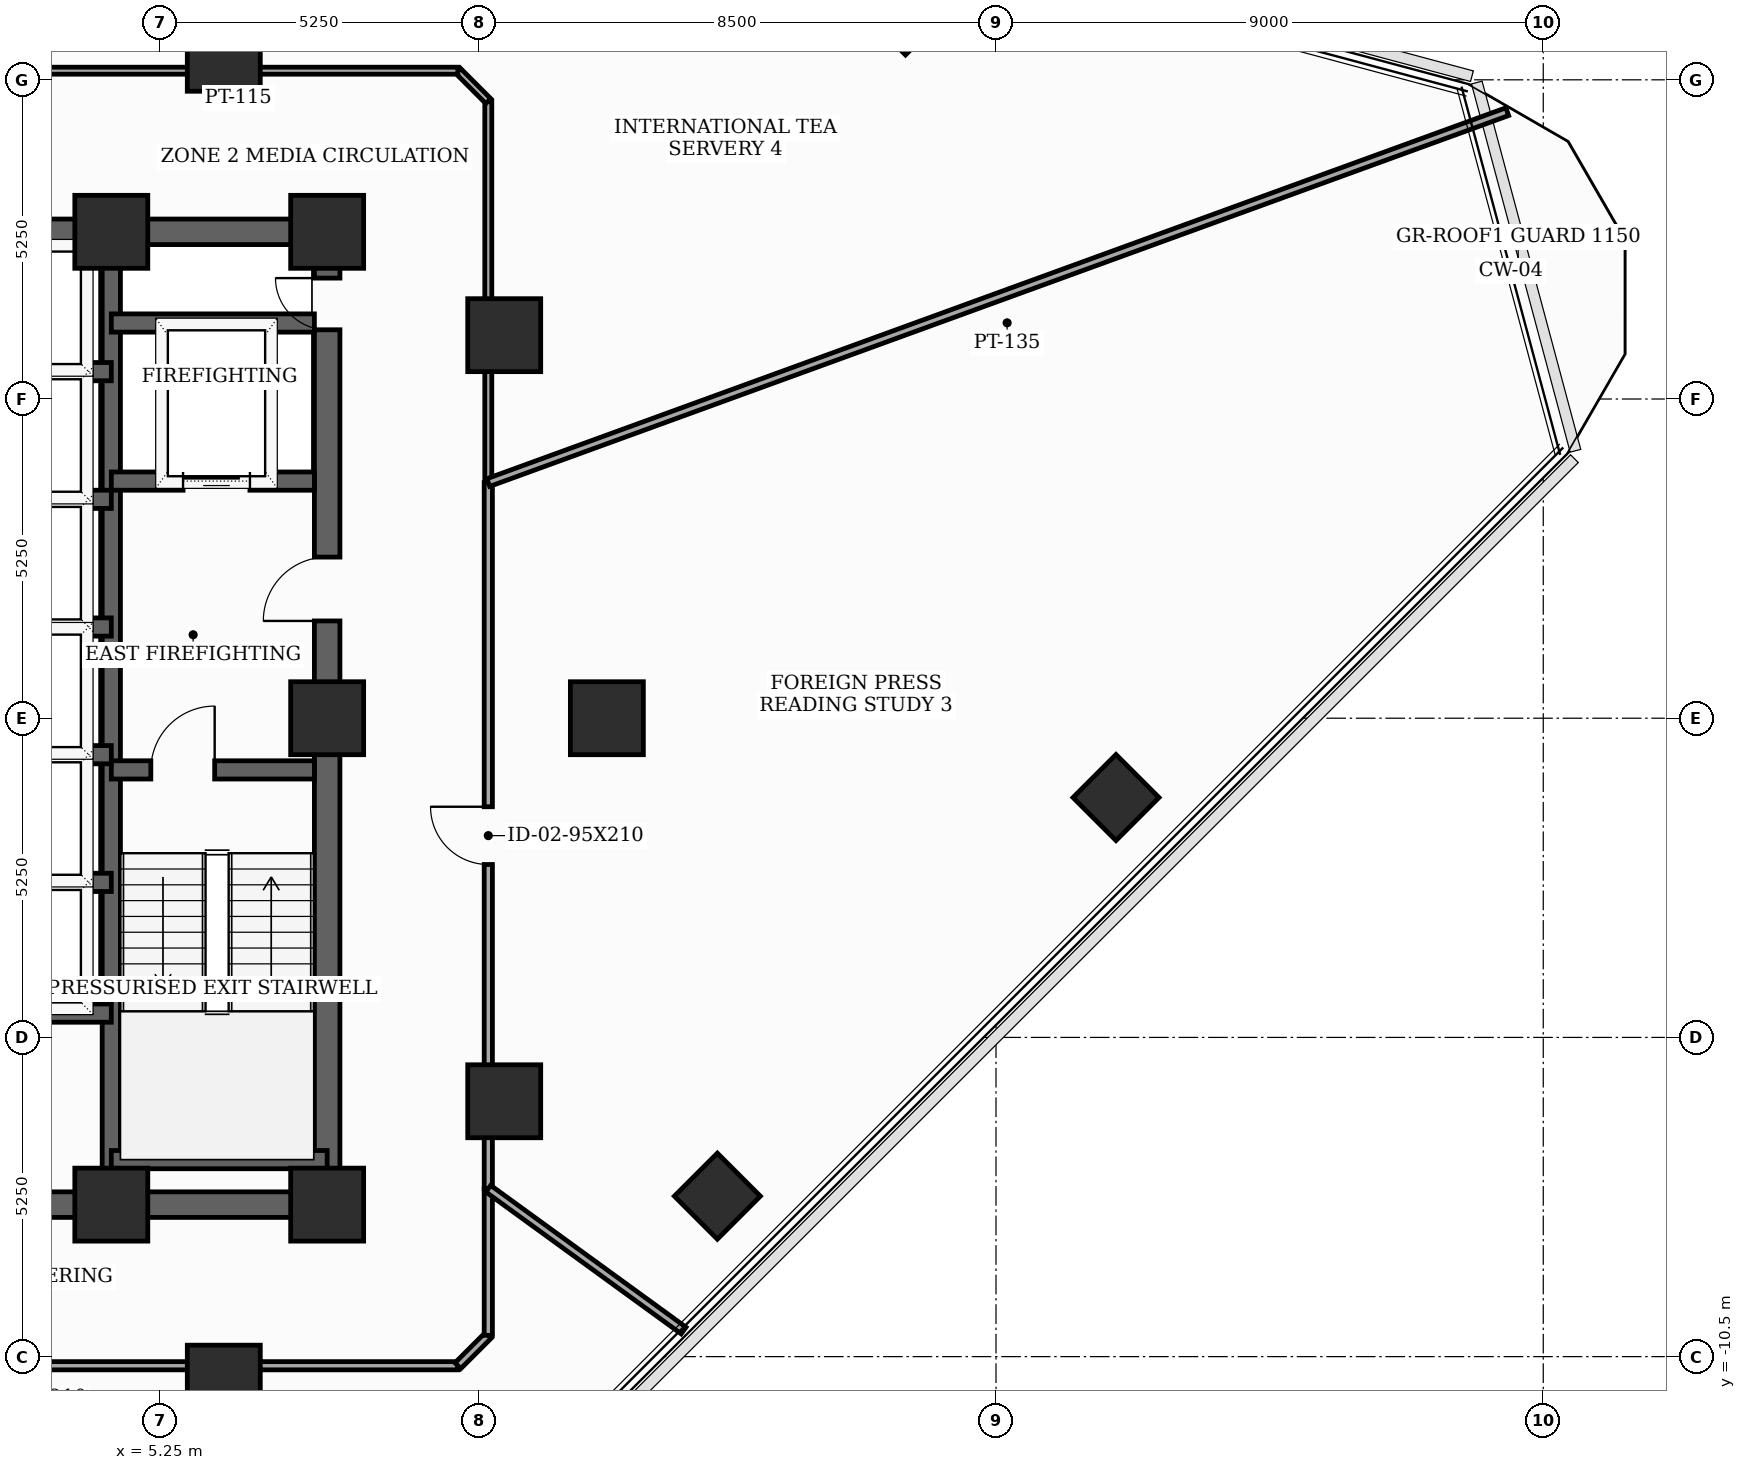
"""IFC4 building model, lengths in metres.
Left out: names, types, materials, properties, quantities, classifications, styles, units other than length and angle.
Written with IfcOpenShell. Run it as: python <this file> out.ifc"""

import sys

from ifc_helpers import new_model, si_unit, direction, frame, frame_2d, origin, origin_2d, place, context, subcontext, project, spatial, rectangle, extrude, element, fill, save


model = new_model("IFC4")
c1 = context("Model", 3, precision=1e-05, world=origin(), true_north=direction((0.0, 1.0)))
c2 = subcontext(c1, "Body", "Model", "MODEL_VIEW")
j1 = project(units=[si_unit("LENGTHUNIT", "METRE"), si_unit("PLANEANGLEUNIT", "RADIAN")], contexts=[c1])
p1 = place(None, origin())
s1 = spatial("IfcSite", under=j1, at=p1, CompositionType="ELEMENT")
p2 = place(p1, origin())
s2 = spatial("IfcBuilding", under=s1, at=p2, CompositionType="ELEMENT")
p3 = place(p2, frame((0.0, 0.0, 202.7)))
s3 = spatial("IfcBuildingStorey", under=s2, at=p3, CompositionType="ELEMENT", Elevation=202.7)
for number, where, z_axis, x_axis in (
    (1, (4.45, -8.0, 0.0), (0.0, 0.0, 1.0), (1.0, 0.0, 0.0)),
    (2, (8.0, -8.0, 0.0), (0.0, 0.0, 1.0), (1.0, 0.0, 0.0)),
    (3, (8.0, 0.0, 0.0), (0.0, 0.0, 1.0), (1.0, 0.0, 0.0)),
    (4, (8.0, 8.0, 0.0), (0.0, 0.0, 1.0), (1.0, 0.0, 0.0)),
    (5, (4.45, 8.0, 0.0), (0.0, 0.0, 1.0), (1.0, 0.0, 0.0)),
    (6, (12.6, 0.0, 0.0), (0.0, 0.0, 1.0), (1.0, 0.0, 0.0)),
    (7, (10.912, 6.3, 0.0), (0.0, 0.0, 1.0), (1.0, 0.0, 0.0)),
    (8, (6.3, 10.912, 0.0), (0.0, 0.0, 1.0), (1.0, 0.0, 0.0)),
    (9, (6.3, -10.912, 0.0), (0.0, 0.0, 1.0), (1.0, 0.0, 0.0)),
    (10, (10.912, -6.3, 0.0), (0.0, 0.0, 1.0), (1.0, 0.0, 0.0)),
):
    element("IfcColumn", number, at=place(p3, frame(where, z_axis=z_axis, x_axis=x_axis)), inside=s3, PredefinedType="COLUMN", context=c2, shape_type="SweptSolid", body=[
        extrude(rectangle(XDim=1.2, YDim=1.2, at=origin_2d()), origin(), (0.0, 0.0, 1.0), 3.7),
    ])
for number, where, z_axis, x_axis in (
    (11, (14.417, -7.861, 0.0), (0.0, 0.0, 1.0), (0.707, 0.707, 0.0)),
    (12, (20.973, -1.305, 0.0), (0.0, 0.0, 1.0), (0.707, 0.707, 0.0)),
    (13, (17.511, 11.616, 0.0), (0.0, 0.0, 1.0), (0.707, 0.707, 0.0)),
):
    element("IfcColumn", number, at=place(p3, frame(where, z_axis=z_axis, x_axis=x_axis)), inside=s3, PredefinedType="COLUMN", context=c2, shape_type="SweptSolid", body=[
        extrude(rectangle(XDim=1.0, YDim=1.0, at=origin_2d()), origin(), (0.0, 0.0, 1.0), 3.7),
    ])
p4 = place(p3, frame((8.0, -8.0, 0.0), z_axis=(0.0, 0.0, 1.0), x_axis=(0.0, 1.0, 0.0)))
e14 = element("IfcWall", 14, at=p4, inside=s3, PredefinedType="SHEAR", context=c2, shape_type="SweptSolid", body=[
    extrude(rectangle(XDim=16.0, YDim=0.42, at=frame_2d((8.0, 0.0))), origin(), (0.0, 0.0, 1.0), 3.5),
])
p5 = place(p4, frame((9.6, 0.0, 0.0)))
e15 = element("IfcOpeningElement", 15, at=p5, cuts=e14, PredefinedType="OPENING", context=c2, shape_type="SweptSolid", body=[
    extrude(rectangle(XDim=1.05, YDim=2.15, at=frame_2d((0.525, 1.075))), frame((0.0, 0.22, 0.0), z_axis=(0.0, -1.0, 0.0), x_axis=(1.0, 0.0, 0.0)), (0.0, 0.0, 1.0), 0.44),
])
p6 = place(p4, frame((14.389, 0.0, 0.0)))
e16 = element("IfcOpeningElement", 16, at=p6, cuts=e14, PredefinedType="OPENING", context=c2, shape_type="SweptSolid", body=[
    extrude(rectangle(XDim=0.85, YDim=2.02, at=frame_2d((0.425, 1.01))), frame((0.0, 0.22, 0.0), z_axis=(0.0, -1.0, 0.0), x_axis=(1.0, 0.0, 0.0)), (0.0, 0.0, 1.0), 0.44),
])
p7 = place(p3, frame((-8.0, -8.0, 0.0), z_axis=(0.0, 0.0, 1.0), x_axis=(1.0, 0.0, 0.0)))
e17 = element("IfcWall", 17, at=p7, inside=s3, PredefinedType="SHEAR", context=c2, shape_type="SweptSolid", body=[
    extrude(rectangle(XDim=16.0, YDim=0.42, at=frame_2d((8.0, 0.0))), origin(), (0.0, 0.0, 1.0), 3.5),
])
p8 = place(p7, frame((4.6, 0.0, 0.0)))
e18 = element("IfcOpeningElement", 18, at=p8, cuts=e17, PredefinedType="OPENING", context=c2, shape_type="SweptSolid", body=[
    extrude(rectangle(XDim=0.95, YDim=2.1, at=frame_2d((0.475, 1.05))), frame((0.0, 0.22, 0.0), z_axis=(0.0, -1.0, 0.0), x_axis=(1.0, 0.0, 0.0)), (0.0, 0.0, 1.0), 0.44),
])
p9 = place(p7, frame((7.52, 0.0, 0.0)))
e19 = element("IfcOpeningElement", 19, at=p9, cuts=e17, PredefinedType="OPENING", context=c2, shape_type="SweptSolid", body=[
    extrude(rectangle(XDim=0.95, YDim=2.1, at=frame_2d((0.475, 1.05))), frame((0.0, 0.22, 0.0), z_axis=(0.0, -1.0, 0.0), x_axis=(1.0, 0.0, 0.0)), (0.0, 0.0, 1.0), 0.44),
])
p10 = place(p7, frame((10.45, 0.0, 0.0)))
e20 = element("IfcOpeningElement", 20, at=p10, cuts=e17, PredefinedType="OPENING", context=c2, shape_type="SweptSolid", body=[
    extrude(rectangle(XDim=0.95, YDim=2.1, at=frame_2d((0.475, 1.05))), frame((0.0, 0.22, 0.0), z_axis=(0.0, -1.0, 0.0), x_axis=(1.0, 0.0, 0.0)), (0.0, 0.0, 1.0), 0.44),
])
p11 = place(p3, frame((-8.0, 8.0, 0.0), z_axis=(0.0, 0.0, 1.0), x_axis=(1.0, 0.0, 0.0)))
e21 = element("IfcWall", 21, at=p11, inside=s3, PredefinedType="SHEAR", context=c2, shape_type="SweptSolid", body=[
    extrude(rectangle(XDim=16.0, YDim=0.42, at=frame_2d((8.0, 0.0))), origin(), (0.0, 0.0, 1.0), 3.5),
])
p12 = place(p11, frame((7.1, 0.0, 0.0)))
e22 = element("IfcOpeningElement", 22, at=p12, cuts=e21, PredefinedType="OPENING", context=c2, shape_type="SweptSolid", body=[
    extrude(rectangle(XDim=1.8, YDim=2.15, at=frame_2d((0.9, 1.075))), frame((0.0, 0.22, 0.0), z_axis=(0.0, -1.0, 0.0), x_axis=(1.0, 0.0, 0.0)), (0.0, 0.0, 1.0), 0.44),
])
p13 = place(p3, frame((4.45, -7.79, 0.0), z_axis=(0.0, 0.0, 1.0), x_axis=(0.0, 1.0, 0.0)))
e23 = element("IfcWall", 23, at=p13, inside=s3, PredefinedType="SHEAR", context=c2, shape_type="SweptSolid", body=[
    extrude(rectangle(XDim=15.58, YDim=0.3, at=frame_2d((7.79, 0.0))), origin(), (0.0, 0.0, 1.0), 3.5),
])
p14 = place(p3, frame((4.45, -0.85, 0.0), z_axis=(0.0, 0.0, 1.0), x_axis=(1.0, 0.0, 0.0)))
e24 = element("IfcWall", 24, at=p14, inside=s3, PredefinedType="SHEAR", context=c2, shape_type="SweptSolid", body=[
    extrude(rectangle(XDim=3.34, YDim=0.3, at=frame_2d((1.67, 0.0))), origin(), (0.0, 0.0, 1.0), 3.5),
])
p15 = place(p14, frame((0.65, 0.0, 0.0)))
e25 = element("IfcOpeningElement", 25, at=p15, cuts=e24, PredefinedType="OPENING", context=c2, shape_type="SweptSolid", body=[
    extrude(rectangle(XDim=1.05, YDim=2.15, at=frame_2d((0.525, 1.075))), frame((0.0, 0.16, 0.0), z_axis=(0.0, -1.0, 0.0), x_axis=(1.0, 0.0, 0.0)), (0.0, 0.0, 1.0), 0.32),
])
p16 = place(p3, frame((4.45, -7.26, 0.0), z_axis=(0.0, 0.0, 1.0), x_axis=(1.0, 0.0, 0.0)))
e26 = element("IfcWall", 26, at=p16, inside=s3, PredefinedType="SHEAR", context=c2, shape_type="SweptSolid", body=[
    extrude(rectangle(XDim=3.55, YDim=0.3, at=frame_2d((1.775, 0.0))), origin(), (0.0, 0.0, 1.0), 3.5),
])
p17 = place(p3, frame((4.45, 3.9, 0.0), z_axis=(0.0, 0.0, 1.0), x_axis=(1.0, 0.0, 0.0)))
e27 = element("IfcWall", 27, at=p17, inside=s3, PredefinedType="SHEAR", context=c2, shape_type="SweptSolid", body=[
    extrude(rectangle(XDim=3.34, YDim=0.3, at=frame_2d((1.67, 0.0))), origin(), (0.0, 0.0, 1.0), 3.5),
])
p18 = place(p17, frame((1.18, 0.0, 0.0)))
e28 = element("IfcOpeningElement", 28, at=p18, cuts=e27, PredefinedType="OPENING", context=c2, shape_type="SweptSolid", body=[
    extrude(rectangle(XDim=1.1, YDim=2.1, at=frame_2d((0.55, 1.05))), frame((0.0, 0.16, 0.0), z_axis=(0.0, -1.0, 0.0), x_axis=(1.0, 0.0, 0.0)), (0.0, 0.0, 1.0), 0.32),
])
p19 = place(p3, frame((4.45, 6.5, 0.0), z_axis=(0.0, 0.0, 1.0), x_axis=(1.0, 0.0, 0.0)))
e29 = element("IfcWall", 29, at=p19, inside=s3, PredefinedType="SHEAR", context=c2, shape_type="SweptSolid", body=[
    extrude(rectangle(XDim=3.34, YDim=0.3, at=frame_2d((1.67, 0.0))), origin(), (0.0, 0.0, 1.0), 3.5),
])
p20 = place(p3, frame((-4.45, -4.85, 0.0), z_axis=(0.0, 0.0, 1.0), x_axis=(1.0, 0.0, 0.0)))
e30 = element("IfcWall", 30, at=p20, inside=s3, PredefinedType="SHEAR", context=c2, shape_type="SweptSolid", body=[
    extrude(rectangle(XDim=8.9, YDim=0.3, at=frame_2d((4.45, 0.0))), origin(), (0.0, 0.0, 1.0), 3.5),
])
for number, where, z_axis, x_axis in (
    (31, (1.68, 1.5, 0.0), (0.0, 0.0, 1.0), (1.0, 0.0, 0.0)),
    (32, (1.68, 3.6, 0.0), (0.0, 0.0, 1.0), (1.0, 0.0, 0.0)),
    (33, (1.68, 5.7, 0.0), (0.0, 0.0, 1.0), (1.0, 0.0, 0.0)),
    (34, (1.68, -2.7, 0.0), (0.0, 0.0, 1.0), (1.0, 0.0, 0.0)),
    (35, (1.68, -0.6, 0.0), (0.0, 0.0, 1.0), (1.0, 0.0, 0.0)),
):
    element("IfcWall", number, at=place(p3, frame(where, z_axis=z_axis, x_axis=x_axis)), inside=s3, PredefinedType="SHEAR", context=c2, shape_type="SweptSolid", body=[
        extrude(rectangle(XDim=2.77, YDim=0.3, at=frame_2d((1.385, 0.0))), origin(), (0.0, 0.0, 1.0), 3.5),
    ])
p21 = place(p3, frame((-4.303, -10.65, 0.0), z_axis=(0.0, 0.0, 1.0), x_axis=(1.0, 0.0, 0.0)))
e36 = element("IfcWall", 36, at=p21, inside=s3, PredefinedType="PARTITIONING", context=c2, shape_type="SweptSolid", body=[
    extrude(rectangle(XDim=14.453, YDim=0.135, at=frame_2d((7.227, 0.0))), origin(), (0.0, 0.0, 1.0), 2.885),
])
p22 = place(p21, frame((6.751, 0.0, 0.0)))
e37 = element("IfcOpeningElement", 37, at=p22, cuts=e36, PredefinedType="OPENING", context=c2, shape_type="SweptSolid", body=[
    extrude(rectangle(XDim=0.95, YDim=2.1, at=frame_2d((0.475, 1.05))), frame((0.0, 0.077, 0.0), z_axis=(0.0, -1.0, 0.0), x_axis=(1.0, 0.0, 0.0)), (0.0, 0.0, 1.0), 0.155),
])
p23 = place(p3, frame((10.15, -10.65, 0.0), z_axis=(0.0, 0.0, 1.0), x_axis=(0.707106781187, 0.707106781187, 0.0)))
e38 = element("IfcWall", 38, at=p23, inside=s3, PredefinedType="PARTITIONING", context=c2, shape_type="SweptSolid", body=[
    extrude(rectangle(XDim=0.707, YDim=0.135, at=frame_2d((0.354, 0.0))), origin(), (0.0, 0.0, 1.0), 3.5),
])
p24 = place(p3, frame((10.65, -10.15, 0.0), z_axis=(0.0, 0.0, 1.0), x_axis=(0.0, 1.0, 0.0)))
e39 = element("IfcWall", 39, at=p24, inside=s3, PredefinedType="PARTITIONING", context=c2, shape_type="SweptSolid", body=[
    extrude(rectangle(XDim=2.412, YDim=0.135, at=frame_2d((1.206, 0.0))), origin(), (0.0, 0.0, 1.0), 3.5),
])
p25 = place(p3, frame((10.65, -7.738, 0.0), z_axis=(0.0, 0.0, 1.0), x_axis=(0.0, 1.0, 0.0)))
e40 = element("IfcWall", 40, at=p25, inside=s3, PredefinedType="PARTITIONING", context=c2, shape_type="SweptSolid", body=[
    extrude(rectangle(XDim=11.614, YDim=0.135, at=frame_2d((5.807, 0.0))), origin(), (0.0, 0.0, 1.0), 2.885),
])
p26 = place(p25, frame((5.332, 0.0, 0.0)))
e41 = element("IfcOpeningElement", 41, at=p26, cuts=e40, PredefinedType="OPENING", context=c2, shape_type="SweptSolid", body=[
    extrude(rectangle(XDim=0.95, YDim=2.1, at=frame_2d((0.475, 1.05))), frame((0.0, 0.077, 0.0), z_axis=(0.0, -1.0, 0.0), x_axis=(1.0, 0.0, 0.0)), (0.0, 0.0, 1.0), 0.155),
])
p27 = place(p3, frame((10.65, 3.876, 0.0), z_axis=(0.0, 0.0, 1.0), x_axis=(0.0, 1.0, 0.0)))
e42 = element("IfcWall", 42, at=p27, inside=s3, PredefinedType="PARTITIONING", context=c2, shape_type="SweptSolid", body=[
    extrude(rectangle(XDim=6.274, YDim=0.115, at=frame_2d((3.137, 0.0))), origin(), (0.0, 0.0, 1.0), 2.885),
])
p28 = place(p3, frame((10.65, 10.15, 0.0), z_axis=(0.0, 0.0, 1.0), x_axis=(-0.707106781187, 0.707106781187, 0.0)))
e43 = element("IfcWall", 43, at=p28, inside=s3, PredefinedType="PARTITIONING", context=c2, shape_type="SweptSolid", body=[
    extrude(rectangle(XDim=0.707, YDim=0.115, at=frame_2d((0.354, 0.0))), origin(), (0.0, 0.0, 1.0), 3.5),
])
p29 = place(p3, frame((10.15, 10.65, 0.0), z_axis=(0.0, 0.0, 1.0), x_axis=(-1.0, 0.0, 0.0)))
e44 = element("IfcWall", 44, at=p29, inside=s3, PredefinedType="PARTITIONING", context=c2, shape_type="SweptSolid", body=[
    extrude(rectangle(XDim=12.414, YDim=0.115, at=frame_2d((6.207, 0.0))), origin(), (0.0, 0.0, 1.0), 2.885),
])
p30 = place(p29, frame((7.222, 0.0, 0.0)))
e45 = element("IfcOpeningElement", 45, at=p30, cuts=e44, PredefinedType="OPENING", context=c2, shape_type="SweptSolid", body=[
    extrude(rectangle(XDim=0.95, YDim=2.1, at=frame_2d((0.475, 1.05))), frame((0.0, 0.067, 0.0), z_axis=(0.0, -1.0, 0.0), x_axis=(1.0, 0.0, 0.0)), (0.0, 0.0, 1.0), 0.135),
])
p31 = place(p3, frame((13.862, -10.071, 0.0), z_axis=(0.0, 0.0, 1.0), x_axis=(-0.80911622839, 0.587648644137, 0.0)))
e46 = element("IfcWall", 46, at=p31, inside=s3, PredefinedType="PARTITIONING", context=c2, shape_type="SweptSolid", body=[
    extrude(rectangle(XDim=3.97, YDim=0.135, at=frame_2d((1.985, 0.0))), origin(), (0.0, 0.0, 1.0), 2.985),
])
p32 = place(p3, frame((27.408, 9.976, 0.0), z_axis=(0.0, 0.0, 1.0), x_axis=(-0.939687855064, -0.342033236756, 0.0)))
e47 = element("IfcWall", 47, at=p32, inside=s3, PredefinedType="PARTITIONING", context=c2, shape_type="SweptSolid", body=[
    extrude(rectangle(XDim=17.833, YDim=0.135, at=frame_2d((8.917, 0.0))), origin(), (0.0, 0.0, 1.0), 2.885),
])
p33 = place(p5, origin())
e48 = element("IfcDoor", 48, at=p33, inside=s3, OperationType="SINGLE_SWING_LEFT", PredefinedType="DOOR", context=c2, shape_type="SweptSolid", body=[
    extrude(rectangle(XDim=1.05, YDim=2.15, at=frame_2d((0.525, 1.075))), frame((0.0, 0.025, 0.0), z_axis=(0.0, -1.0, 0.0), x_axis=(1.0, 0.0, 0.0)), (0.0, 0.0, 1.0), 0.05),
])
fill(e15, e48)
p34 = place(p6, origin())
e49 = element("IfcDoor", 49, at=p34, inside=s3, OperationType="SINGLE_SWING_RIGHT", PredefinedType="TRAPDOOR", context=c2, shape_type="SweptSolid", body=[
    extrude(rectangle(XDim=0.85, YDim=2.02, at=frame_2d((0.425, 1.01))), frame((0.0, 0.025, 0.0), z_axis=(0.0, -1.0, 0.0), x_axis=(1.0, 0.0, 0.0)), (0.0, 0.0, 1.0), 0.05),
])
fill(e16, e49)
p35 = place(p15, origin())
e50 = element("IfcDoor", 50, at=p35, inside=s3, OperationType="SINGLE_SWING_RIGHT", PredefinedType="DOOR", context=c2, shape_type="SweptSolid", body=[
    extrude(rectangle(XDim=1.05, YDim=2.15, at=frame_2d((0.525, 1.075))), frame((0.0, 0.025, 0.0), z_axis=(0.0, -1.0, 0.0), x_axis=(1.0, 0.0, 0.0)), (0.0, 0.0, 1.0), 0.05),
])
fill(e25, e50)
p36 = place(p18, origin())
e51 = element("IfcDoor", 51, at=p36, inside=s3, OperationType="SLIDING_TO_LEFT", PredefinedType="DOOR", context=c2, shape_type="SweptSolid", body=[
    extrude(rectangle(XDim=1.1, YDim=2.1, at=frame_2d((0.55, 1.05))), frame((0.0, 0.025, 0.0), z_axis=(0.0, -1.0, 0.0), x_axis=(1.0, 0.0, 0.0)), (0.0, 0.0, 1.0), 0.05),
])
fill(e28, e51)
p37 = place(p26, origin())
e52 = element("IfcDoor", 52, at=p37, inside=s3, OperationType="SINGLE_SWING_RIGHT", PredefinedType="DOOR", context=c2, shape_type="SweptSolid", body=[
    extrude(rectangle(XDim=0.95, YDim=2.1, at=frame_2d((0.475, 1.05))), frame((0.0, 0.025, 0.0), z_axis=(0.0, -1.0, 0.0), x_axis=(1.0, 0.0, 0.0)), (0.0, 0.0, 1.0), 0.05),
])
fill(e41, e52)
save(model, sys.argv[1])
